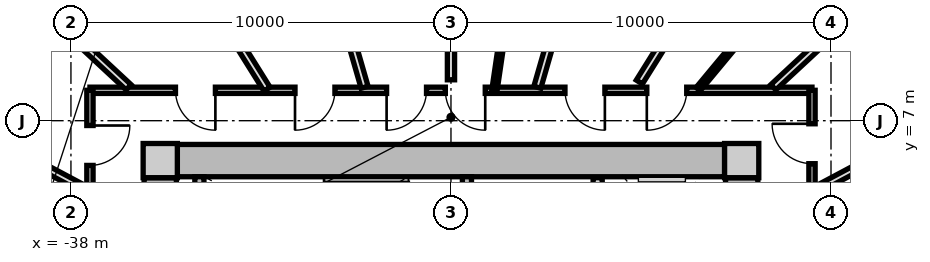
"""IFC4 building model, lengths in metres.
Left out: names, types, materials, properties, quantities, classifications, styles, units other than length and angle.
Written with IfcOpenShell. Run it as: python <this file> out.ifc"""

import sys

from ifc_helpers import new_model, si_unit, direction, frame, frame_2d, origin, origin_2d, place, context, subcontext, project, spatial, rectangle, extrude, source, transform, mapped, element, fill, save


model = new_model("IFC4")
c1 = context("Model", 3, precision=1e-05, world=origin(), true_north=direction((0.0, 1.0)))
c2 = subcontext(c1, "Body", "Model", "MODEL_VIEW")
j1 = project(units=[si_unit("LENGTHUNIT", "METRE"), si_unit("PLANEANGLEUNIT", "RADIAN")], contexts=[c1])
p1 = place(None, origin())
s1 = spatial("IfcSite", under=j1, at=p1, CompositionType="ELEMENT")
p2 = place(p1, origin())
s2 = spatial("IfcBuilding", under=s1, at=p2, CompositionType="ELEMENT")
p3 = place(p2, frame((0.0, 0.0, 49.05)))
s3 = spatial("IfcBuildingStorey", under=s2, at=p3, CompositionType="ELEMENT", Elevation=49.05)
m1 = source(origin(), c2, "Body", "SweptSolid", [
    extrude(rectangle(XDim=0.9, YDim=0.9, at=origin_2d()), origin(), (0.0, 0.0, 1.0), 3.05),
])
for number, where, z_axis, x_axis in (
    (1, (-20.35, 5.95, 0.0), (0.0, 0.0, 1.0), (1.0, 0.0, 0.0)),
    (2, (-35.65, 5.95, 0.0), (0.0, 0.0, 1.0), (1.0, 0.0, 0.0)),
):
    element("IfcColumn", number, at=place(p3, frame(where, z_axis=z_axis, x_axis=x_axis)), inside=s3, PredefinedType="COLUMN", context=c2, shape_type="MappedRepresentation", body=[
        mapped(m1, transform((0.0, 0.0, 0.0), x_axis=(1.0, 0.0, 0.0), y_axis=(0.0, 1.0, 0.0), z_axis=(0.0, 0.0, 1.0), scale=1.0)),
    ])
m2 = source(origin(), c2, "Body", "SweptSolid", [
    extrude(rectangle(XDim=14.4, YDim=0.85, at=frame_2d((7.2, 0.0))), origin(), (0.0, 0.0, 1.0), 2.79),
])
p4 = place(p3, frame((-35.2, 5.95, 0.0), z_axis=(0.0, 0.0, 1.0), x_axis=(1.0, 0.0, 0.0)))
e3 = element("IfcWall", 3, at=p4, inside=s3, PredefinedType="SHEAR", context=c2, shape_type="MappedRepresentation", body=[
    mapped(m2, transform((0.0, 0.0, 0.0), x_axis=(1.0, 0.0, 0.0), y_axis=(0.0, 1.0, 0.0), z_axis=(0.0, 0.0, 1.0), scale=1.0)),
])
m3 = source(origin(), c2, "Body", "SweptSolid", [
    extrude(rectangle(XDim=11.0, YDim=0.85, at=frame_2d((5.5, 0.0))), origin(), (0.0, 0.0, 1.0), 2.79),
])
p5 = place(p3, frame((-35.65, -5.5, 0.0), z_axis=(0.0, 0.0, 1.0), x_axis=(0.0, 1.0, 0.0)))
e4 = element("IfcWall", 4, at=p5, inside=s3, PredefinedType="SHEAR", context=c2, shape_type="MappedRepresentation", body=[
    mapped(m3, transform((0.0, 0.0, 0.0), x_axis=(1.0, 0.0, 0.0), y_axis=(0.0, 1.0, 0.0), z_axis=(0.0, 0.0, 1.0), scale=1.0)),
])
p6 = place(p5, frame((3.8, 0.0, 0.0)))
e5 = element("IfcOpeningElement", 5, at=p6, cuts=e4, PredefinedType="OPENING", context=c2, shape_type="SweptSolid", body=[
    extrude(rectangle(XDim=1.2, YDim=2.15, at=frame_2d((0.6, 1.075))), frame((0.0, 0.435, 0.0), z_axis=(0.0, -1.0, 0.0), x_axis=(1.0, 0.0, 0.0)), (0.0, 0.0, 1.0), 0.87),
])
p7 = place(p3, frame((-20.35, 5.5, 0.0), z_axis=(0.0, 0.0, 1.0), x_axis=(0.0, -1.0, 0.0)))
e6 = element("IfcWall", 6, at=p7, inside=s3, PredefinedType="SHEAR", context=c2, shape_type="MappedRepresentation", body=[
    mapped(m3, transform((0.0, 0.0, 0.0), x_axis=(1.0, 0.0, 0.0), y_axis=(0.0, 1.0, 0.0), z_axis=(0.0, 0.0, 1.0), scale=1.0)),
])
p8 = place(p7, frame((5.65, 0.0, 0.0)))
e7 = element("IfcOpeningElement", 7, at=p8, cuts=e6, PredefinedType="OPENING", context=c2, shape_type="SweptSolid", body=[
    extrude(rectangle(XDim=1.2, YDim=2.15, at=frame_2d((0.6, 1.075))), frame((0.0, 0.435, 0.0), z_axis=(0.0, -1.0, 0.0), x_axis=(1.0, 0.0, 0.0)), (0.0, 0.0, 1.0), 0.87),
])
m4 = source(origin(), c2, "Body", "SweptSolid", [
    extrude(rectangle(XDim=3.075, YDim=0.24, at=frame_2d((1.538, 0.0))), origin(), (0.0, 0.0, 1.0), 2.79),
])
p9 = place(p3, frame((-34.62, 2.45, 0.0), z_axis=(0.0, 0.0, 1.0), x_axis=(0.0, 1.0, 0.0)))
e8 = element("IfcWall", 8, at=p9, inside=s3, PredefinedType="PARTITIONING", context=c2, shape_type="MappedRepresentation", body=[
    mapped(m4, transform((0.0, 0.0, 0.0), x_axis=(1.0, 0.0, 0.0), y_axis=(0.0, 1.0, 0.0), z_axis=(0.0, 0.0, 1.0), scale=1.0)),
])
p10 = place(p3, frame((-27.58, 2.45, 0.0), z_axis=(0.0, 0.0, 1.0), x_axis=(0.0, 1.0, 0.0)))
e9 = element("IfcWall", 9, at=p10, inside=s3, PredefinedType="PARTITIONING", context=c2, shape_type="MappedRepresentation", body=[
    mapped(m4, transform((0.0, 0.0, 0.0), x_axis=(1.0, 0.0, 0.0), y_axis=(0.0, 1.0, 0.0), z_axis=(0.0, 0.0, 1.0), scale=1.0)),
])
p11 = place(p10, frame((0.55, 0.0, 0.0)))
e10 = element("IfcOpeningElement", 10, at=p11, cuts=e9, PredefinedType="OPENING", context=c2, shape_type="SweptSolid", body=[
    extrude(rectangle(XDim=1.1, YDim=2.15, at=frame_2d((0.55, 1.075))), frame((0.0, 0.13, 0.0), z_axis=(0.0, -1.0, 0.0), x_axis=(1.0, 0.0, 0.0)), (0.0, 0.0, 1.0), 0.26),
])
m5 = source(origin(), c2, "Body", "SweptSolid", [
    extrude(rectangle(XDim=5.0, YDim=0.24, at=frame_2d((2.5, 0.0))), origin(), (0.0, 0.0, 1.0), 2.775),
])
p12 = place(p3, frame((-24.14, 0.5, 0.0), z_axis=(0.0, 0.0, 1.0), x_axis=(0.0, 1.0, 0.0)))
e11 = element("IfcWall", 11, at=p12, inside=s3, PredefinedType="PARTITIONING", context=c2, shape_type="MappedRepresentation", body=[
    mapped(m5, transform((0.0, 0.0, 0.0), x_axis=(1.0, 0.0, 0.0), y_axis=(0.0, 1.0, 0.0), z_axis=(0.0, 0.0, 1.0), scale=1.0)),
])
p13 = place(p12, frame((3.05, 0.0, 0.0)))
e12 = element("IfcOpeningElement", 12, at=p13, cuts=e11, PredefinedType="OPENING", context=c2, shape_type="SweptSolid", body=[
    extrude(rectangle(XDim=1.3, YDim=2.2, at=frame_2d((0.65, 1.1))), frame((0.0, 0.13, 0.0), z_axis=(0.0, -1.0, 0.0), x_axis=(1.0, 0.0, 0.0)), (0.0, 0.0, 1.0), 0.26),
])
p14 = place(p12, frame((0.55, 0.0, 0.0)))
e13 = element("IfcOpeningElement", 13, at=p14, cuts=e11, PredefinedType="OPENING", context=c2, shape_type="SweptSolid", body=[
    extrude(rectangle(XDim=1.3, YDim=2.2, at=frame_2d((0.65, 1.1))), frame((0.0, 0.13, 0.0), z_axis=(0.0, -1.0, 0.0), x_axis=(1.0, 0.0, 0.0)), (0.0, 0.0, 1.0), 0.26),
])
m6 = source(origin(), c2, "Body", "SweptSolid", [
    extrude(rectangle(XDim=19.0, YDim=0.165, at=frame_2d((9.5, 0.0))), origin(), (0.0, 0.0, 1.0), 2.775),
])
p15 = place(p3, frame((-37.5, 7.8, 0.0), z_axis=(0.0, 0.0, 1.0), x_axis=(1.0, 0.0, 0.0)))
e14 = element("IfcWall", 14, at=p15, inside=s3, PredefinedType="PARTITIONING", context=c2, shape_type="MappedRepresentation", body=[
    mapped(m6, transform((0.0, 0.0, 0.0), x_axis=(1.0, 0.0, 0.0), y_axis=(0.0, 1.0, 0.0), z_axis=(0.0, 0.0, 1.0), scale=1.0)),
])
p16 = place(p15, frame((14.653, 0.0, 0.0)))
e15 = element("IfcOpeningElement", 15, at=p16, cuts=e14, PredefinedType="OPENING", context=c2, shape_type="SweptSolid", body=[
    extrude(rectangle(XDim=1.05, YDim=2.15, at=frame_2d((0.525, 1.075))), frame((0.0, 0.093, 0.0), z_axis=(0.0, -1.0, 0.0), x_axis=(1.0, 0.0, 0.0)), (0.0, 0.0, 1.0), 0.185),
])
p17 = place(p15, frame((12.5, 0.0, 0.0)))
e16 = element("IfcOpeningElement", 16, at=p17, cuts=e14, PredefinedType="OPENING", context=c2, shape_type="SweptSolid", body=[
    extrude(rectangle(XDim=1.05, YDim=2.15, at=frame_2d((0.525, 1.075))), frame((0.0, 0.093, 0.0), z_axis=(0.0, -1.0, 0.0), x_axis=(1.0, 0.0, 0.0)), (0.0, 0.0, 1.0), 0.185),
])
p18 = place(p15, frame((9.352, 0.0, 0.0)))
e17 = element("IfcOpeningElement", 17, at=p18, cuts=e14, PredefinedType="OPENING", context=c2, shape_type="SweptSolid", body=[
    extrude(rectangle(XDim=1.05, YDim=2.15, at=frame_2d((0.525, 1.075))), frame((0.0, 0.093, 0.0), z_axis=(0.0, -1.0, 0.0), x_axis=(1.0, 0.0, 0.0)), (0.0, 0.0, 1.0), 0.185),
])
p19 = place(p15, frame((7.806, 0.0, 0.0)))
e18 = element("IfcOpeningElement", 18, at=p19, cuts=e14, PredefinedType="OPENING", context=c2, shape_type="SweptSolid", body=[
    extrude(rectangle(XDim=1.05, YDim=2.15, at=frame_2d((0.525, 1.075))), frame((0.0, 0.093, 0.0), z_axis=(0.0, -1.0, 0.0), x_axis=(1.0, 0.0, 0.0)), (0.0, 0.0, 1.0), 0.185),
])
p20 = place(p15, frame((5.396, 0.0, 0.0)))
e19 = element("IfcOpeningElement", 19, at=p20, cuts=e14, PredefinedType="OPENING", context=c2, shape_type="SweptSolid", body=[
    extrude(rectangle(XDim=1.05, YDim=2.15, at=frame_2d((0.525, 1.075))), frame((0.0, 0.093, 0.0), z_axis=(0.0, -1.0, 0.0), x_axis=(1.0, 0.0, 0.0)), (0.0, 0.0, 1.0), 0.185),
])
p21 = place(p15, frame((2.251, 0.0, 0.0)))
e20 = element("IfcOpeningElement", 20, at=p21, cuts=e14, PredefinedType="OPENING", context=c2, shape_type="SweptSolid", body=[
    extrude(rectangle(XDim=1.05, YDim=2.15, at=frame_2d((0.525, 1.075))), frame((0.0, 0.093, 0.0), z_axis=(0.0, -1.0, 0.0), x_axis=(1.0, 0.0, 0.0)), (0.0, 0.0, 1.0), 0.185),
])
m7 = source(origin(), c2, "Body", "SweptSolid", [
    extrude(rectangle(XDim=15.6, YDim=0.165, at=frame_2d((7.8, 0.0))), origin(), (0.0, 0.0, 1.0), 2.775),
])
p22 = place(p3, frame((-37.5, -7.8, 0.0), z_axis=(0.0, 0.0, 1.0), x_axis=(0.0, 1.0, 0.0)))
e21 = element("IfcWall", 21, at=p22, inside=s3, PredefinedType="PARTITIONING", context=c2, shape_type="MappedRepresentation", body=[
    mapped(m7, transform((0.0, 0.0, 0.0), x_axis=(1.0, 0.0, 0.0), y_axis=(0.0, 1.0, 0.0), z_axis=(0.0, 0.0, 1.0), scale=1.0)),
])
p23 = place(p22, frame((13.623, 0.0, 0.0)))
e22 = element("IfcOpeningElement", 22, at=p23, cuts=e21, PredefinedType="OPENING", context=c2, shape_type="SweptSolid", body=[
    extrude(rectangle(XDim=1.05, YDim=2.15, at=frame_2d((0.525, 1.075))), frame((0.0, 0.093, 0.0), z_axis=(0.0, -1.0, 0.0), x_axis=(1.0, 0.0, 0.0)), (0.0, 0.0, 1.0), 0.185),
])
p24 = place(p22, frame((11.018, 0.0, 0.0)))
e23 = element("IfcOpeningElement", 23, at=p24, cuts=e21, PredefinedType="OPENING", context=c2, shape_type="SweptSolid", body=[
    extrude(rectangle(XDim=1.05, YDim=2.15, at=frame_2d((0.525, 1.075))), frame((0.0, 0.093, 0.0), z_axis=(0.0, -1.0, 0.0), x_axis=(1.0, 0.0, 0.0)), (0.0, 0.0, 1.0), 0.185),
])
p25 = place(p22, frame((8.467, 0.0, 0.0)))
e24 = element("IfcOpeningElement", 24, at=p25, cuts=e21, PredefinedType="OPENING", context=c2, shape_type="SweptSolid", body=[
    extrude(rectangle(XDim=1.05, YDim=2.15, at=frame_2d((0.525, 1.075))), frame((0.0, 0.093, 0.0), z_axis=(0.0, -1.0, 0.0), x_axis=(1.0, 0.0, 0.0)), (0.0, 0.0, 1.0), 0.185),
])
p26 = place(p22, frame((6.035, 0.0, 0.0)))
e25 = element("IfcOpeningElement", 25, at=p26, cuts=e21, PredefinedType="OPENING", context=c2, shape_type="SweptSolid", body=[
    extrude(rectangle(XDim=1.05, YDim=2.15, at=frame_2d((0.525, 1.075))), frame((0.0, 0.093, 0.0), z_axis=(0.0, -1.0, 0.0), x_axis=(1.0, 0.0, 0.0)), (0.0, 0.0, 1.0), 0.185),
])
p27 = place(p22, frame((3.489, 0.0, 0.0)))
e26 = element("IfcOpeningElement", 26, at=p27, cuts=e21, PredefinedType="OPENING", context=c2, shape_type="SweptSolid", body=[
    extrude(rectangle(XDim=1.05, YDim=2.15, at=frame_2d((0.525, 1.075))), frame((0.0, 0.093, 0.0), z_axis=(0.0, -1.0, 0.0), x_axis=(1.0, 0.0, 0.0)), (0.0, 0.0, 1.0), 0.185),
])
p28 = place(p22, frame((0.882, 0.0, 0.0)))
e27 = element("IfcOpeningElement", 27, at=p28, cuts=e21, PredefinedType="OPENING", context=c2, shape_type="SweptSolid", body=[
    extrude(rectangle(XDim=1.05, YDim=2.15, at=frame_2d((0.525, 1.075))), frame((0.0, 0.093, 0.0), z_axis=(0.0, -1.0, 0.0), x_axis=(1.0, 0.0, 0.0)), (0.0, 0.0, 1.0), 0.185),
])
p29 = place(p3, frame((-18.5, 7.8, 0.0), z_axis=(0.0, 0.0, 1.0), x_axis=(0.0, -1.0, 0.0)))
e28 = element("IfcWall", 28, at=p29, inside=s3, PredefinedType="PARTITIONING", context=c2, shape_type="MappedRepresentation", body=[
    mapped(m7, transform((0.0, 0.0, 0.0), x_axis=(1.0, 0.0, 0.0), y_axis=(0.0, 1.0, 0.0), z_axis=(0.0, 0.0, 1.0), scale=1.0)),
])
p30 = place(p29, frame((12.141, 0.0, 0.0)))
e29 = element("IfcOpeningElement", 29, at=p30, cuts=e28, PredefinedType="OPENING", context=c2, shape_type="SweptSolid", body=[
    extrude(rectangle(XDim=1.25, YDim=2.2, at=frame_2d((0.625, 1.1))), frame((0.0, 0.093, 0.0), z_axis=(0.0, -1.0, 0.0), x_axis=(1.0, 0.0, 0.0)), (0.0, 0.0, 1.0), 0.185),
])
p31 = place(p29, frame((7.175, 0.0, 0.0)))
e30 = element("IfcOpeningElement", 30, at=p31, cuts=e28, PredefinedType="OPENING", context=c2, shape_type="SweptSolid", body=[
    extrude(rectangle(XDim=1.25, YDim=2.2, at=frame_2d((0.625, 1.1))), frame((0.0, 0.093, 0.0), z_axis=(0.0, -1.0, 0.0), x_axis=(1.0, 0.0, 0.0)), (0.0, 0.0, 1.0), 0.185),
])
p32 = place(p29, frame((2.826, 0.0, 0.0)))
e31 = element("IfcOpeningElement", 31, at=p32, cuts=e28, PredefinedType="OPENING", context=c2, shape_type="SweptSolid", body=[
    extrude(rectangle(XDim=1.05, YDim=2.15, at=frame_2d((0.525, 1.075))), frame((0.0, 0.093, 0.0), z_axis=(0.0, -1.0, 0.0), x_axis=(1.0, 0.0, 0.0)), (0.0, 0.0, 1.0), 0.185),
])
p33 = place(p29, frame((0.881, 0.0, 0.0)))
e32 = element("IfcOpeningElement", 32, at=p33, cuts=e28, PredefinedType="OPENING", context=c2, shape_type="SweptSolid", body=[
    extrude(rectangle(XDim=1.05, YDim=2.15, at=frame_2d((0.525, 1.075))), frame((0.0, 0.093, 0.0), z_axis=(0.0, -1.0, 0.0), x_axis=(1.0, 0.0, 0.0)), (0.0, 0.0, 1.0), 0.185),
])
m8 = source(origin(), c2, "Body", "SweptSolid", [
    extrude(rectangle(XDim=7.435, YDim=0.19, at=frame_2d((3.717, 0.0))), origin(), (0.0, 0.0, 1.0), 2.225),
])
p34 = place(p3, frame((-36.483, 7.88, 0.0), z_axis=(0.0, 0.0, 1.0), x_axis=(-0.732651956848, 0.680603489652, 0.0)))
e33 = element("IfcWall", 33, at=p34, inside=s3, PredefinedType="PARTITIONING", context=c2, shape_type="MappedRepresentation", body=[
    mapped(m8, transform((0.0, 0.0, 0.0), x_axis=(1.0, 0.0, 0.0), y_axis=(0.0, 1.0, 0.0), z_axis=(0.0, 0.0, 1.0), scale=1.0)),
])
m9 = source(origin(), c2, "Body", "SweptSolid", [
    extrude(rectangle(XDim=7.873, YDim=0.19, at=frame_2d((3.937, 0.0))), origin(), (0.0, 0.0, 1.0), 2.775),
])
p35 = place(p3, frame((-37.53, 5.138, 0.0), z_axis=(0.0, 0.0, 1.0), x_axis=(-0.882666052726, 0.470000680175, 0.0)))
e34 = element("IfcWall", 34, at=p35, inside=s3, PredefinedType="PARTITIONING", context=c2, shape_type="MappedRepresentation", body=[
    mapped(m9, transform((0.0, 0.0, 0.0), x_axis=(1.0, 0.0, 0.0), y_axis=(0.0, 1.0, 0.0), z_axis=(0.0, 0.0, 1.0), scale=1.0)),
])
p36 = place(p3, frame((-19.517, 7.88, 0.0), z_axis=(0.0, 0.0, 1.0), x_axis=(0.732651956848, 0.680603489652, 0.0)))
e35 = element("IfcWall", 35, at=p36, inside=s3, PredefinedType="PARTITIONING", context=c2, shape_type="MappedRepresentation", body=[
    mapped(m8, transform((0.0, 0.0, 0.0), x_axis=(1.0, 0.0, 0.0), y_axis=(0.0, 1.0, 0.0), z_axis=(0.0, 0.0, 1.0), scale=1.0)),
])
m10 = source(origin(), c2, "Body", "SweptSolid", [
    extrude(rectangle(XDim=7.677, YDim=0.19, at=frame_2d((3.838, 0.0))), origin(), (0.0, 0.0, 1.0), 2.775),
])
p37 = place(p3, frame((-18.297, 5.231, 0.0), z_axis=(0.0, 0.0, 1.0), x_axis=(0.882725057546, 0.469889851753, 0.0)))
e36 = element("IfcWall", 36, at=p37, inside=s3, PredefinedType="PARTITIONING", context=c2, shape_type="MappedRepresentation", body=[
    mapped(m10, transform((0.0, 0.0, 0.0), x_axis=(1.0, 0.0, 0.0), y_axis=(0.0, 1.0, 0.0), z_axis=(0.0, 0.0, 1.0), scale=1.0)),
])
m11 = source(origin(), c2, "Body", "SweptSolid", [
    extrude(rectangle(XDim=10.196, YDim=0.19, at=frame_2d((5.098, 0.0))), origin(), (0.0, 0.0, 1.0), 2.225),
])
p38 = place(p3, frame((-25.727, 7.88, 0.0), z_axis=(0.0, 0.0, 1.0), x_axis=(0.277136420347, 0.960830580549, 0.0)))
e37 = element("IfcWall", 37, at=p38, inside=s3, PredefinedType="PARTITIONING", context=c2, shape_type="MappedRepresentation", body=[
    mapped(m11, transform((0.0, 0.0, 0.0), x_axis=(1.0, 0.0, 0.0), y_axis=(0.0, 1.0, 0.0), z_axis=(0.0, 0.0, 1.0), scale=1.0)),
])
m12 = source(origin(), c2, "Body", "SweptSolid", [
    extrude(rectangle(XDim=8.598, YDim=0.19, at=frame_2d((4.299, 0.0))), origin(), (0.0, 0.0, 1.0), 2.775),
])
p39 = place(p3, frame((-23.043, 8.017, 0.0), z_axis=(0.0, 0.0, 1.0), x_axis=(0.530039776395, 0.847972779893, 0.0)))
e38 = element("IfcWall", 38, at=p39, inside=s3, PredefinedType="PARTITIONING", context=c2, shape_type="MappedRepresentation", body=[
    mapped(m12, transform((0.0, 0.0, 0.0), x_axis=(1.0, 0.0, 0.0), y_axis=(0.0, 1.0, 0.0), z_axis=(0.0, 0.0, 1.0), scale=1.0)),
])
m13 = source(origin(), c2, "Body", "SweptSolid", [
    extrude(rectangle(XDim=3.594, YDim=0.14, at=frame_2d((1.797, 0.0))), origin(), (0.0, 0.0, 1.0), 2.775),
])
p40 = place(p3, frame((-21.496, 7.83, 0.0), z_axis=(0.0, 0.0, 1.0), x_axis=(0.639001147083, 0.769205781326, 0.0)))
e39 = element("IfcWall", 39, at=p40, inside=s3, PredefinedType="PARTITIONING", context=c2, shape_type="MappedRepresentation", body=[
    mapped(m13, transform((0.0, 0.0, 0.0), x_axis=(1.0, 0.0, 0.0), y_axis=(0.0, 1.0, 0.0), z_axis=(0.0, 0.0, 1.0), scale=1.0)),
])
p41 = place(p40, frame((1.337, 0.0, 0.0)))
e40 = element("IfcOpeningElement", 40, at=p41, cuts=e39, PredefinedType="OPENING", context=c2, shape_type="SweptSolid", body=[
    extrude(rectangle(XDim=0.92, YDim=2.1, at=frame_2d((0.46, 1.05))), frame((0.0, 0.08, 0.0), z_axis=(0.0, -1.0, 0.0), x_axis=(1.0, 0.0, 0.0)), (0.0, 0.0, 1.0), 0.16),
])
p42 = place(p3, frame((-30.273, 7.88, 0.0), z_axis=(0.0, 0.0, 1.0), x_axis=(-0.277136420347, 0.960830580549, 0.0)))
e41 = element("IfcWall", 41, at=p42, inside=s3, PredefinedType="PARTITIONING", context=c2, shape_type="MappedRepresentation", body=[
    mapped(m11, transform((0.0, 0.0, 0.0), x_axis=(1.0, 0.0, 0.0), y_axis=(0.0, 1.0, 0.0), z_axis=(0.0, 0.0, 1.0), scale=1.0)),
])
m14 = source(origin(), c2, "Body", "SweptSolid", [
    extrude(rectangle(XDim=9.601, YDim=0.19, at=frame_2d((4.8, 0.0))), origin(), (0.0, 0.0, 1.0), 2.775),
])
p43 = place(p3, frame((-28.0, 8.076, 0.0), z_axis=(0.0, 0.0, 1.0), x_axis=(0.0, 1.0, 0.0)))
e42 = element("IfcWall", 42, at=p43, inside=s3, PredefinedType="PARTITIONING", context=c2, shape_type="MappedRepresentation", body=[
    mapped(m14, transform((0.0, 0.0, 0.0), x_axis=(1.0, 0.0, 0.0), y_axis=(0.0, 1.0, 0.0), z_axis=(0.0, 0.0, 1.0), scale=1.0)),
])
m15 = source(origin(), c2, "Body", "SweptSolid", [
    extrude(rectangle(XDim=5.37, YDim=0.14, at=frame_2d((2.685, 0.0))), origin(), (0.0, 0.0, 1.0), 2.775),
])
p44 = place(p3, frame((-26.851, 7.83, 0.0), z_axis=(0.0, 0.0, 1.0), x_axis=(0.145131397853, 0.989412389935, 0.0)))
e43 = element("IfcWall", 43, at=p44, inside=s3, PredefinedType="PARTITIONING", context=c2, shape_type="MappedRepresentation", body=[
    mapped(m15, transform((0.0, 0.0, 0.0), x_axis=(1.0, 0.0, 0.0), y_axis=(0.0, 1.0, 0.0), z_axis=(0.0, 0.0, 1.0), scale=1.0)),
])
p45 = place(p44, frame((2.225, 0.0, 0.0)))
e44 = element("IfcOpeningElement", 44, at=p45, cuts=e43, PredefinedType="OPENING", context=c2, shape_type="SweptSolid", body=[
    extrude(rectangle(XDim=0.92, YDim=2.1, at=frame_2d((0.46, 1.05))), frame((0.0, 0.08, 0.0), z_axis=(0.0, -1.0, 0.0), x_axis=(1.0, 0.0, 0.0)), (0.0, 0.0, 1.0), 0.16),
])
m16 = source(origin(), c2, "Body", "SweptSolid", [
    extrude(rectangle(XDim=8.818, YDim=0.19, at=frame_2d((4.409, 0.0))), origin(), (0.0, 0.0, 1.0), 2.775),
])
p46 = place(p3, frame((-32.841, 7.83, 0.0), z_axis=(0.0, 0.0, 1.0), x_axis=(-0.529931746109, 0.848040296487, 0.0)))
e45 = element("IfcWall", 45, at=p46, inside=s3, PredefinedType="PARTITIONING", context=c2, shape_type="MappedRepresentation", body=[
    mapped(m16, transform((0.0, 0.0, 0.0), x_axis=(1.0, 0.0, 0.0), y_axis=(0.0, 1.0, 0.0), z_axis=(0.0, 0.0, 1.0), scale=1.0)),
])
m17 = source(origin(), c2, "Body", "SweptSolid", [
    extrude(rectangle(XDim=1.05, YDim=2.15, at=frame_2d((0.525, 1.075))), frame((0.0, 0.025, 0.0), z_axis=(0.0, -1.0, 0.0), x_axis=(1.0, 0.0, 0.0)), (0.0, 0.0, 1.0), 0.05),
])
p47 = place(p23, frame((1.05, 0.0, 0.0), z_axis=(0.0, 0.0, 1.0), x_axis=(-1.0, 0.0, 0.0)))
e46 = element("IfcDoor", 46, at=p47, inside=s3, OperationType="SINGLE_SWING_LEFT", PredefinedType="DOOR", context=c2, shape_type="MappedRepresentation", body=[
    mapped(m17, transform((0.0, 0.0, 0.0), x_axis=(1.0, 0.0, 0.0), y_axis=(0.0, 1.0, 0.0), z_axis=(0.0, 0.0, 1.0), scale=1.0)),
])
fill(e22, e46)
p48 = place(p33, frame((1.05, 0.0, 0.0), z_axis=(0.0, 0.0, 1.0), x_axis=(-1.0, 0.0, 0.0)))
e47 = element("IfcDoor", 47, at=p48, inside=s3, OperationType="SINGLE_SWING_RIGHT", PredefinedType="DOOR", context=c2, shape_type="MappedRepresentation", body=[
    mapped(m17, transform((0.0, 0.0, 0.0), x_axis=(1.0, 0.0, 0.0), y_axis=(0.0, 1.0, 0.0), z_axis=(0.0, 0.0, 1.0), scale=1.0)),
])
fill(e32, e47)
p49 = place(p16, frame((1.05, 0.0, 0.0), z_axis=(0.0, 0.0, 1.0), x_axis=(-1.0, 0.0, 0.0)))
e48 = element("IfcDoor", 48, at=p49, inside=s3, OperationType="SINGLE_SWING_RIGHT", PredefinedType="DOOR", context=c2, shape_type="MappedRepresentation", body=[
    mapped(m17, transform((0.0, 0.0, 0.0), x_axis=(1.0, 0.0, 0.0), y_axis=(0.0, 1.0, 0.0), z_axis=(0.0, 0.0, 1.0), scale=1.0)),
])
fill(e15, e48)
p50 = place(p17, frame((1.05, 0.0, 0.0), z_axis=(0.0, 0.0, 1.0), x_axis=(-1.0, 0.0, 0.0)))
e49 = element("IfcDoor", 49, at=p50, inside=s3, OperationType="SINGLE_SWING_LEFT", PredefinedType="DOOR", context=c2, shape_type="MappedRepresentation", body=[
    mapped(m17, transform((0.0, 0.0, 0.0), x_axis=(1.0, 0.0, 0.0), y_axis=(0.0, 1.0, 0.0), z_axis=(0.0, 0.0, 1.0), scale=1.0)),
])
fill(e16, e49)
p51 = place(p18, frame((1.05, 0.0, 0.0), z_axis=(0.0, 0.0, 1.0), x_axis=(-1.0, 0.0, 0.0)))
e50 = element("IfcDoor", 50, at=p51, inside=s3, OperationType="SINGLE_SWING_LEFT", PredefinedType="DOOR", context=c2, shape_type="MappedRepresentation", body=[
    mapped(m17, transform((0.0, 0.0, 0.0), x_axis=(1.0, 0.0, 0.0), y_axis=(0.0, 1.0, 0.0), z_axis=(0.0, 0.0, 1.0), scale=1.0)),
])
fill(e17, e50)
p52 = place(p19, frame((1.05, 0.0, 0.0), z_axis=(0.0, 0.0, 1.0), x_axis=(-1.0, 0.0, 0.0)))
e51 = element("IfcDoor", 51, at=p52, inside=s3, OperationType="SINGLE_SWING_RIGHT", PredefinedType="DOOR", context=c2, shape_type="MappedRepresentation", body=[
    mapped(m17, transform((0.0, 0.0, 0.0), x_axis=(1.0, 0.0, 0.0), y_axis=(0.0, 1.0, 0.0), z_axis=(0.0, 0.0, 1.0), scale=1.0)),
])
fill(e18, e51)
p53 = place(p20, frame((1.05, 0.0, 0.0), z_axis=(0.0, 0.0, 1.0), x_axis=(-1.0, 0.0, 0.0)))
e52 = element("IfcDoor", 52, at=p53, inside=s3, OperationType="SINGLE_SWING_RIGHT", PredefinedType="DOOR", context=c2, shape_type="MappedRepresentation", body=[
    mapped(m17, transform((0.0, 0.0, 0.0), x_axis=(1.0, 0.0, 0.0), y_axis=(0.0, 1.0, 0.0), z_axis=(0.0, 0.0, 1.0), scale=1.0)),
])
fill(e19, e52)
p54 = place(p21, frame((1.05, 0.0, 0.0), z_axis=(0.0, 0.0, 1.0), x_axis=(-1.0, 0.0, 0.0)))
e53 = element("IfcDoor", 53, at=p54, inside=s3, OperationType="SINGLE_SWING_LEFT", PredefinedType="DOOR", context=c2, shape_type="MappedRepresentation", body=[
    mapped(m17, transform((0.0, 0.0, 0.0), x_axis=(1.0, 0.0, 0.0), y_axis=(0.0, 1.0, 0.0), z_axis=(0.0, 0.0, 1.0), scale=1.0)),
])
fill(e20, e53)
save(model, sys.argv[1])
